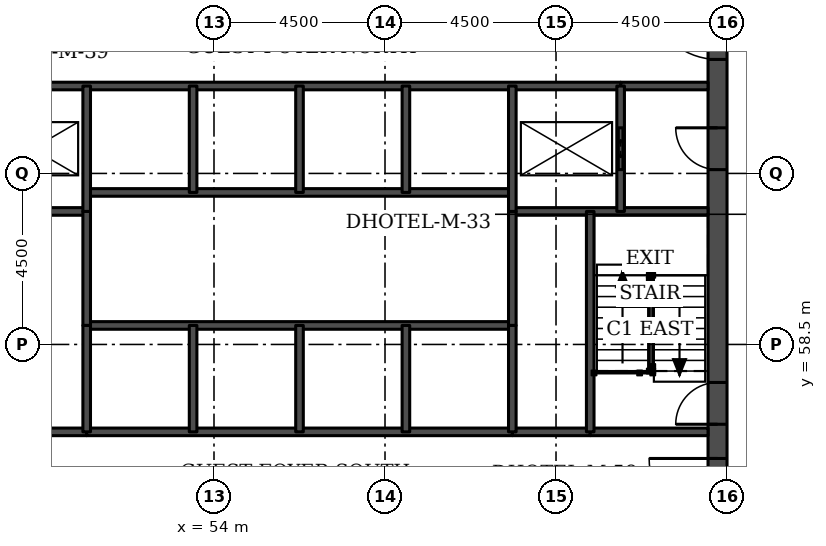
"""IFC4 building model, lengths in metres.
Left out: names, types, materials, properties, quantities, classifications, styles, units other than length and angle.
Written with IfcOpenShell. Run it as: python <this file> out.ifc"""

import sys

from ifc_helpers import new_model, si_unit, direction, frame, frame_2d, origin, place, context, subcontext, project, spatial, rectangle, extrude, element, fill, save


model = new_model("IFC4")
c1 = context("Model", 3, precision=1e-05, world=origin(), true_north=direction((0.0, 1.0)))
c2 = subcontext(c1, "Body", "Model", "MODEL_VIEW")
j1 = project(units=[si_unit("LENGTHUNIT", "METRE"), si_unit("PLANEANGLEUNIT", "RADIAN")], contexts=[c1])
p1 = place(None, origin())
s1 = spatial("IfcSite", under=j1, at=p1, CompositionType="ELEMENT")
p2 = place(p1, origin())
s2 = spatial("IfcBuilding", under=s1, at=p2, CompositionType="ELEMENT")
p3 = place(p2, frame((0.0, 0.0, 23.1)))
s3 = spatial("IfcBuildingStorey", under=s2, at=p3, CompositionType="ELEMENT", Elevation=23.1)
p4 = place(p3, frame((67.25, 49.5, 0.0), z_axis=(0.0, 0.0, 1.0), x_axis=(0.0, 1.0, 0.0)))
e1 = element("IfcWall", 1, at=p4, inside=s3, PredefinedType="SHEAR", context=c2, shape_type="SweptSolid", body=[
    extrude(rectangle(XDim=22.5, YDim=0.5, at=frame_2d((11.25, 0.0))), origin(), (0.0, 0.0, 1.0), 3.3),
])
p5 = place(p4, frame((4.2, 0.0, 0.0)))
e2 = element("IfcOpeningElement", 2, at=p5, cuts=e1, PredefinedType="OPENING", context=c2, shape_type="SweptSolid", body=[
    extrude(rectangle(XDim=1.8, YDim=2.1, at=frame_2d((0.9, 1.05))), frame((0.0, 0.26, 0.0), z_axis=(0.0, -1.0, 0.0), x_axis=(1.0, 0.0, 0.0)), (0.0, 0.0, 1.0), 0.52),
])
p6 = place(p4, frame((6.9, 0.0, 0.0)))
e3 = element("IfcOpeningElement", 3, at=p6, cuts=e1, PredefinedType="OPENING", context=c2, shape_type="SweptSolid", body=[
    extrude(rectangle(XDim=1.1, YDim=2.1, at=frame_2d((0.55, 1.05))), frame((0.0, 0.26, 0.0), z_axis=(0.0, -1.0, 0.0), x_axis=(1.0, 0.0, 0.0)), (0.0, 0.0, 1.0), 0.52),
])
p7 = place(p4, frame((13.6, 0.0, 0.0)))
e4 = element("IfcOpeningElement", 4, at=p7, cuts=e1, PredefinedType="OPENING", context=c2, shape_type="SweptSolid", body=[
    extrude(rectangle(XDim=1.1, YDim=2.1, at=frame_2d((0.55, 1.05))), frame((0.0, 0.26, 0.0), z_axis=(0.0, -1.0, 0.0), x_axis=(1.0, 0.0, 0.0)), (0.0, 0.0, 1.0), 0.52),
])
p8 = place(p4, frame((16.5, 0.0, 0.0)))
e5 = element("IfcOpeningElement", 5, at=p8, cuts=e1, PredefinedType="OPENING", context=c2, shape_type="SweptSolid", body=[
    extrude(rectangle(XDim=1.8, YDim=2.1, at=frame_2d((0.9, 1.05))), frame((0.0, 0.26, 0.0), z_axis=(0.0, -1.0, 0.0), x_axis=(1.0, 0.0, 0.0)), (0.0, 0.0, 1.0), 0.52),
])
for number, where, z_axis, x_axis in (
    (6, (48.6, 56.2, 0.0), (0.0, 0.0, 1.0), (1.0, 0.0, 0.0)),
    (7, (61.85, 56.2, 0.0), (0.0, 0.0, 1.0), (1.0, 0.0, 0.0)),
):
    element("IfcWall", number, at=place(p3, frame(where, z_axis=z_axis, x_axis=x_axis)), inside=s3, PredefinedType="SOLIDWALL", context=c2, shape_type="SweptSolid", body=[
        extrude(rectangle(XDim=2.05, YDim=0.2, at=frame_2d((1.025, 0.0))), origin(), (0.0, 0.0, 1.0), 3.08),
    ])
p9 = place(p3, frame((50.65, 56.2, 0.0), z_axis=(0.0, 0.0, 1.0), x_axis=(1.0, 0.0, 0.0)))
e8 = element("IfcWall", 8, at=p9, inside=s3, PredefinedType="SOLIDWALL", context=c2, shape_type="SweptSolid", body=[
    extrude(rectangle(XDim=11.2, YDim=0.2, at=frame_2d((5.6, 0.0))), origin(), (0.0, 0.0, 1.0), 3.08),
])
p10 = place(p3, frame((63.9, 56.2, 0.0), z_axis=(0.0, 0.0, 1.0), x_axis=(1.0, 0.0, 0.0)))
e9 = element("IfcWall", 9, at=p10, inside=s3, PredefinedType="SOLIDWALL", context=c2, shape_type="SweptSolid", body=[
    extrude(rectangle(XDim=3.1, YDim=0.2, at=frame_2d((1.55, 0.0))), origin(), (0.0, 0.0, 1.0), 3.08),
])
p11 = place(p3, frame((50.65, 59.0, 0.0), z_axis=(0.0, 0.0, 1.0), x_axis=(1.0, 0.0, 0.0)))
e10 = element("IfcWall", 10, at=p11, inside=s3, PredefinedType="SOLIDWALL", context=c2, shape_type="SweptSolid", body=[
    extrude(rectangle(XDim=11.2, YDim=0.2, at=frame_2d((5.6, 0.0))), origin(), (0.0, 0.0, 1.0), 3.3),
])
for number, where, z_axis, x_axis in (
    (11, (45.5, 62.0, 0.0), (0.0, 0.0, 1.0), (1.0, 0.0, 0.0)),
    (12, (61.85, 62.0, 0.0), (0.0, 0.0, 1.0), (1.0, 0.0, 0.0)),
):
    element("IfcWall", number, at=place(p3, frame(where, z_axis=z_axis, x_axis=x_axis)), inside=s3, PredefinedType="SOLIDWALL", context=c2, shape_type="SweptSolid", body=[
        extrude(rectangle(XDim=5.15, YDim=0.2, at=frame_2d((2.575, 0.0))), origin(), (0.0, 0.0, 1.0), 3.08),
    ])
p12 = place(p3, frame((50.65, 62.5, 0.0), z_axis=(0.0, 0.0, 1.0), x_axis=(1.0, 0.0, 0.0)))
e13 = element("IfcWall", 13, at=p12, inside=s3, PredefinedType="SOLIDWALL", context=c2, shape_type="SweptSolid", body=[
    extrude(rectangle(XDim=11.2, YDim=0.2, at=frame_2d((5.6, 0.0))), origin(), (0.0, 0.0, 1.0), 3.3),
])
p13 = place(p3, frame((64.7, 65.3, 0.0), z_axis=(0.0, 0.0, 1.0), x_axis=(1.0, 0.0, 0.0)))
e14 = element("IfcWall", 14, at=p13, inside=s3, PredefinedType="SOLIDWALL", context=c2, shape_type="SweptSolid", body=[
    extrude(rectangle(XDim=2.3, YDim=0.2, at=frame_2d((1.15, 0.0))), origin(), (0.0, 0.0, 1.0), 3.08),
])
p14 = place(p3, frame((47.8, 65.3, 0.0), z_axis=(0.0, 0.0, 1.0), x_axis=(1.0, 0.0, 0.0)))
e15 = element("IfcWall", 15, at=p14, inside=s3, PredefinedType="SOLIDWALL", context=c2, shape_type="SweptSolid", body=[
    extrude(rectangle(XDim=16.9, YDim=0.2, at=frame_2d((8.45, 0.0))), origin(), (0.0, 0.0, 1.0), 3.08),
])
p15 = place(p3, frame((50.65, 59.0, 0.0), z_axis=(0.0, 0.0, 1.0), x_axis=(0.0, 1.0, 0.0)))
e16 = element("IfcWall", 16, at=p15, inside=s3, PredefinedType="SOLIDWALL", context=c2, shape_type="SweptSolid", body=[
    extrude(rectangle(XDim=3.0, YDim=0.2, at=frame_2d((1.5, 0.0))), origin(), (0.0, 0.0, 1.0), 3.3),
])
p16 = place(p3, frame((50.65, 56.2, 0.0), z_axis=(0.0, 0.0, 1.0), x_axis=(0.0, 1.0, 0.0)))
e17 = element("IfcWall", 17, at=p16, inside=s3, PredefinedType="SOLIDWALL", context=c2, shape_type="SweptSolid", body=[
    extrude(rectangle(XDim=2.8, YDim=0.2, at=frame_2d((1.4, 0.0))), origin(), (0.0, 0.0, 1.0), 3.08),
])
p17 = place(p3, frame((50.65, 62.0, 0.0), z_axis=(0.0, 0.0, 1.0), x_axis=(0.0, 1.0, 0.0)))
e18 = element("IfcWall", 18, at=p17, inside=s3, PredefinedType="SOLIDWALL", context=c2, shape_type="SweptSolid", body=[
    extrude(rectangle(XDim=3.3, YDim=0.2, at=frame_2d((1.65, 0.0))), origin(), (0.0, 0.0, 1.0), 3.08),
])
for number, where, z_axis, x_axis in (
    (19, (53.45, 56.2, 0.0), (0.0, 0.0, 1.0), (0.0, 1.0, 0.0)),
    (20, (53.45, 62.5, 0.0), (0.0, 0.0, 1.0), (0.0, 1.0, 0.0)),
    (21, (56.25, 56.2, 0.0), (0.0, 0.0, 1.0), (0.0, 1.0, 0.0)),
    (22, (56.25, 62.5, 0.0), (0.0, 0.0, 1.0), (0.0, 1.0, 0.0)),
    (23, (59.05, 56.2, 0.0), (0.0, 0.0, 1.0), (0.0, 1.0, 0.0)),
    (24, (59.05, 62.5, 0.0), (0.0, 0.0, 1.0), (0.0, 1.0, 0.0)),
):
    element("IfcWall", number, at=place(p3, frame(where, z_axis=z_axis, x_axis=x_axis)), inside=s3, PredefinedType="SOLIDWALL", context=c2, shape_type="SweptSolid", body=[
        extrude(rectangle(XDim=2.8, YDim=0.2, at=frame_2d((1.4, 0.0))), origin(), (0.0, 0.0, 1.0), 3.08),
    ])
p18 = place(p3, frame((61.85, 59.0, 0.0), z_axis=(0.0, 0.0, 1.0), x_axis=(0.0, 1.0, 0.0)))
e25 = element("IfcWall", 25, at=p18, inside=s3, PredefinedType="SOLIDWALL", context=c2, shape_type="SweptSolid", body=[
    extrude(rectangle(XDim=3.0, YDim=0.2, at=frame_2d((1.5, 0.0))), origin(), (0.0, 0.0, 1.0), 3.3),
])
p19 = place(p3, frame((61.85, 56.2, 0.0), z_axis=(0.0, 0.0, 1.0), x_axis=(0.0, 1.0, 0.0)))
e26 = element("IfcWall", 26, at=p19, inside=s3, PredefinedType="SOLIDWALL", context=c2, shape_type="SweptSolid", body=[
    extrude(rectangle(XDim=2.8, YDim=0.2, at=frame_2d((1.4, 0.0))), origin(), (0.0, 0.0, 1.0), 3.08),
])
p20 = place(p3, frame((61.85, 62.0, 0.0), z_axis=(0.0, 0.0, 1.0), x_axis=(0.0, 1.0, 0.0)))
e27 = element("IfcWall", 27, at=p20, inside=s3, PredefinedType="SOLIDWALL", context=c2, shape_type="SweptSolid", body=[
    extrude(rectangle(XDim=3.3, YDim=0.2, at=frame_2d((1.65, 0.0))), origin(), (0.0, 0.0, 1.0), 3.08),
])
p21 = place(p3, frame((63.9, 56.2, 0.0), z_axis=(0.0, 0.0, 1.0), x_axis=(0.0, 1.0, 0.0)))
e28 = element("IfcWall", 28, at=p21, inside=s3, PredefinedType="SOLIDWALL", context=c2, shape_type="SweptSolid", body=[
    extrude(rectangle(XDim=5.8, YDim=0.2, at=frame_2d((2.9, 0.0))), origin(), (0.0, 0.0, 1.0), 3.08),
])
p22 = place(p3, frame((64.7, 62.0, 0.0), z_axis=(0.0, 0.0, 1.0), x_axis=(0.0, 1.0, 0.0)))
e29 = element("IfcWall", 29, at=p22, inside=s3, PredefinedType="SOLIDWALL", context=c2, shape_type="SweptSolid", body=[
    extrude(rectangle(XDim=3.3, YDim=0.2, at=frame_2d((1.65, 0.0))), origin(), (0.0, 0.0, 1.0), 3.08),
])
p23 = place(p22, frame((1.1, 0.0, 0.0)))
e30 = element("IfcOpeningElement", 30, at=p23, cuts=e29, PredefinedType="OPENING", context=c2, shape_type="SweptSolid", body=[
    extrude(rectangle(XDim=1.1, YDim=2.1, at=frame_2d((0.55, 1.05))), frame((0.0, 0.11, 0.0), z_axis=(0.0, -1.0, 0.0), x_axis=(1.0, 0.0, 0.0)), (0.0, 0.0, 1.0), 0.22),
])
p24 = place(p23, origin())
e31 = element("IfcDoor", 31, at=p24, inside=s3, OperationType="DOUBLE_DOOR_SLIDING", PredefinedType="DOOR", context=c2, shape_type="SweptSolid", body=[
    extrude(rectangle(XDim=1.1, YDim=2.1, at=frame_2d((0.55, 1.05))), frame((0.0, 0.025, 0.0), z_axis=(0.0, -1.0, 0.0), x_axis=(1.0, 0.0, 0.0)), (0.0, 0.0, 1.0), 0.05),
])
fill(e30, e31)
p25 = place(p5, origin())
e32 = element("IfcDoor", 32, at=p25, inside=s3, OperationType="SINGLE_SWING_RIGHT", PredefinedType="DOOR", context=c2, shape_type="SweptSolid", body=[
    extrude(rectangle(XDim=1.8, YDim=2.1, at=frame_2d((0.9, 1.05))), frame((0.0, 0.025, 0.0), z_axis=(0.0, -1.0, 0.0), x_axis=(1.0, 0.0, 0.0)), (0.0, 0.0, 1.0), 0.05),
])
fill(e2, e32)
p26 = place(p6, origin())
e33 = element("IfcDoor", 33, at=p26, inside=s3, OperationType="SINGLE_SWING_LEFT", PredefinedType="DOOR", context=c2, shape_type="SweptSolid", body=[
    extrude(rectangle(XDim=1.1, YDim=2.1, at=frame_2d((0.55, 1.05))), frame((0.0, 0.025, 0.0), z_axis=(0.0, -1.0, 0.0), x_axis=(1.0, 0.0, 0.0)), (0.0, 0.0, 1.0), 0.05),
])
fill(e3, e33)
p27 = place(p7, origin())
e34 = element("IfcDoor", 34, at=p27, inside=s3, OperationType="SINGLE_SWING_RIGHT", PredefinedType="DOOR", context=c2, shape_type="SweptSolid", body=[
    extrude(rectangle(XDim=1.1, YDim=2.1, at=frame_2d((0.55, 1.05))), frame((0.0, 0.025, 0.0), z_axis=(0.0, -1.0, 0.0), x_axis=(1.0, 0.0, 0.0)), (0.0, 0.0, 1.0), 0.05),
])
fill(e4, e34)
p28 = place(p8, origin())
e35 = element("IfcDoor", 35, at=p28, inside=s3, OperationType="SINGLE_SWING_RIGHT", PredefinedType="DOOR", context=c2, shape_type="SweptSolid", body=[
    extrude(rectangle(XDim=1.8, YDim=2.1, at=frame_2d((0.9, 1.05))), frame((0.0, 0.025, 0.0), z_axis=(0.0, -1.0, 0.0), x_axis=(1.0, 0.0, 0.0)), (0.0, 0.0, 1.0), 0.05),
])
fill(e5, e35)
save(model, sys.argv[1])
